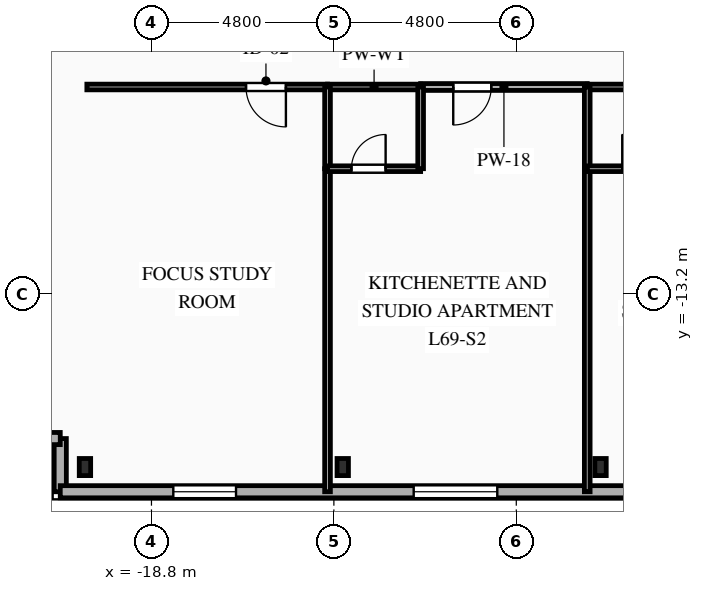
"""IFC4 building model, lengths in metres.
Left out: names, types, materials, properties, quantities, classifications, styles, units other than length and angle.
Written with IfcOpenShell. Run it as: python <this file> out.ifc"""

import sys

from ifc_helpers import new_model, si_unit, direction, frame, frame_2d, origin, origin_2d, place, context, subcontext, project, spatial, rectangle, i_section, extrude, element, fill, save


model = new_model("IFC4")
c1 = context("Model", 3, precision=1e-05, world=origin(), true_north=direction((0.0, 1.0)))
c2 = subcontext(c1, "Body", "Model", "MODEL_VIEW")
j1 = project(units=[si_unit("LENGTHUNIT", "METRE"), si_unit("PLANEANGLEUNIT", "RADIAN")], contexts=[c1])
p1 = place(None, origin())
s1 = spatial("IfcSite", under=j1, at=p1, CompositionType="ELEMENT")
p2 = place(p1, origin())
s2 = spatial("IfcBuilding", under=s1, at=p2, CompositionType="ELEMENT")
p3 = place(p2, frame((0.0, 0.0, 245.05)))
s3 = spatial("IfcBuildingStorey", under=s2, at=p3, CompositionType="ELEMENT", Elevation=245.05)
for number, where, z_axis, x_axis in (
    (1, (-20.55, -17.75, 0.0), (0.0, 0.0, 1.0), (1.0, 0.0, 0.0)),
    (2, (-13.767, -17.75, 0.0), (0.0, 0.0, 1.0), (1.0, 0.0, 0.0)),
    (3, (-6.983, -17.75, 0.0), (0.0, 0.0, 1.0), (1.0, 0.0, 0.0)),
):
    element("IfcColumn", number, at=place(p3, frame(where, z_axis=z_axis, x_axis=x_axis)), inside=s3, PredefinedType="COLUMN", context=c2, shape_type="SweptSolid", body=[
        extrude(i_section(OverallWidth=0.3, OverallDepth=0.45, WebThickness=0.014, FlangeThickness=0.026, FilletRadius=0.027, at=origin_2d()), origin(), (0.0, 0.0, 1.0), 3.35),
    ])
p4 = place(p3, frame((-21.2, -18.4, 0.0), z_axis=(0.0, 0.0, 1.0), x_axis=(0.0, 1.0, 0.0)))
e4 = element("IfcWall", 4, at=p4, inside=s3, PredefinedType="SOLIDWALL", context=c2, shape_type="SweptSolid", body=[
    extrude(rectangle(XDim=1.4, YDim=0.32, at=frame_2d((0.7, 0.0))), origin(), (0.0, 0.0, 1.0), 3.04),
])
p5 = place(p3, frame((-21.2, -17.0, 0.0), z_axis=(0.0, 0.0, 1.0), x_axis=(-1.0, 0.0, 0.0)))
e5 = element("IfcWall", 5, at=p5, inside=s3, PredefinedType="SOLIDWALL", context=c2, shape_type="SweptSolid", body=[
    extrude(rectangle(XDim=1.4, YDim=0.32, at=frame_2d((0.7, 0.0))), origin(), (0.0, 0.0, 1.0), 3.04),
])
p6 = place(p3, frame((20.8, -18.4, 0.0), z_axis=(0.0, 0.0, 1.0), x_axis=(-1.0, 0.0, 0.0)))
e6 = element("IfcWall", 6, at=p6, inside=s3, PredefinedType="SOLIDWALL", context=c2, shape_type="SweptSolid", body=[
    extrude(rectangle(XDim=42.0, YDim=0.32, at=frame_2d((21.0, 0.0))), origin(), (0.0, 0.0, 1.0), 3.04),
])
p7 = place(p6, frame((3.255, 0.0, 0.85)))
e7 = element("IfcOpeningElement", 7, at=p7, cuts=e6, PredefinedType="OPENING", context=c2, shape_type="SweptSolid", body=[
    extrude(rectangle(XDim=1.65, YDim=1.85, at=frame_2d((0.825, 0.925))), frame((0.0, 0.17, 0.0), z_axis=(0.0, -1.0, 0.0), x_axis=(1.0, 0.0, 0.0)), (0.0, 0.0, 1.0), 0.34),
])
p8 = place(p6, frame((9.98, 0.0, 0.85)))
e8 = element("IfcOpeningElement", 8, at=p8, cuts=e6, PredefinedType="OPENING", context=c2, shape_type="SweptSolid", body=[
    extrude(rectangle(XDim=2.2, YDim=1.85, at=frame_2d((1.1, 0.925))), frame((0.0, 0.17, 0.0), z_axis=(0.0, -1.0, 0.0), x_axis=(1.0, 0.0, 0.0)), (0.0, 0.0, 1.0), 0.34),
])
p9 = place(p6, frame((16.82, 0.0, 0.85)))
e9 = element("IfcOpeningElement", 9, at=p9, cuts=e6, PredefinedType="OPENING", context=c2, shape_type="SweptSolid", body=[
    extrude(rectangle(XDim=2.2, YDim=1.85, at=frame_2d((1.1, 0.925))), frame((0.0, 0.17, 0.0), z_axis=(0.0, -1.0, 0.0), x_axis=(1.0, 0.0, 0.0)), (0.0, 0.0, 1.0), 0.34),
])
p10 = place(p6, frame((23.66, 0.0, 0.85)))
e10 = element("IfcOpeningElement", 10, at=p10, cuts=e6, PredefinedType="OPENING", context=c2, shape_type="SweptSolid", body=[
    extrude(rectangle(XDim=2.2, YDim=1.85, at=frame_2d((1.1, 0.925))), frame((0.0, 0.17, 0.0), z_axis=(0.0, -1.0, 0.0), x_axis=(1.0, 0.0, 0.0)), (0.0, 0.0, 1.0), 0.34),
])
p11 = place(p6, frame((30.5, 0.0, 0.85)))
e11 = element("IfcOpeningElement", 11, at=p11, cuts=e6, PredefinedType="OPENING", context=c2, shape_type="SweptSolid", body=[
    extrude(rectangle(XDim=2.2, YDim=1.85, at=frame_2d((1.1, 0.925))), frame((0.0, 0.17, 0.0), z_axis=(0.0, -1.0, 0.0), x_axis=(1.0, 0.0, 0.0)), (0.0, 0.0, 1.0), 0.34),
])
p12 = place(p6, frame((37.375, 0.0, 0.85)))
e12 = element("IfcOpeningElement", 12, at=p12, cuts=e6, PredefinedType="OPENING", context=c2, shape_type="SweptSolid", body=[
    extrude(rectangle(XDim=1.65, YDim=1.85, at=frame_2d((0.825, 0.925))), frame((0.0, 0.17, 0.0), z_axis=(0.0, -1.0, 0.0), x_axis=(1.0, 0.0, 0.0)), (0.0, 0.0, 1.0), 0.34),
])
p13 = place(p3, frame((-14.167, -7.75, 0.0), z_axis=(0.0, 0.0, 1.0), x_axis=(-1.0, 0.0, 0.0)))
e13 = element("IfcWall", 13, at=p13, inside=s3, PredefinedType="PARTITIONING", context=c2, shape_type="SweptSolid", body=[
    extrude(rectangle(XDim=6.333, YDim=0.15, at=frame_2d((3.167, 0.0))), origin(), (0.0, 0.0, 1.0), 3.04),
])
p14 = place(p13, frame((1.095, 0.0, 0.0)))
e14 = element("IfcOpeningElement", 14, at=p14, cuts=e13, PredefinedType="OPENING", context=c2, shape_type="SweptSolid", body=[
    extrude(rectangle(XDim=1.05, YDim=2.15, at=frame_2d((0.525, 1.075))), frame((0.0, 0.085, 0.0), z_axis=(0.0, -1.0, 0.0), x_axis=(1.0, 0.0, 0.0)), (0.0, 0.0, 1.0), 0.17),
])
p15 = place(p3, frame((-7.333, -7.75, 0.0), z_axis=(0.0, 0.0, 1.0), x_axis=(-1.0, 0.0, 0.0)))
e15 = element("IfcWall", 15, at=p15, inside=s3, PredefinedType="PARTITIONING", context=c2, shape_type="SweptSolid", body=[
    extrude(rectangle(XDim=4.384, YDim=0.18, at=frame_2d((2.192, 0.0))), origin(), (0.0, 0.0, 1.0), 3.04),
])
p16 = place(p15, frame((2.526, 0.0, 0.0)))
e16 = element("IfcOpeningElement", 16, at=p16, cuts=e15, PredefinedType="OPENING", context=c2, shape_type="SweptSolid", body=[
    extrude(rectangle(XDim=1.0, YDim=2.15, at=frame_2d((0.5, 1.075))), frame((0.0, 0.1, 0.0), z_axis=(0.0, -1.0, 0.0), x_axis=(1.0, 0.0, 0.0)), (0.0, 0.0, 1.0), 0.2),
])
for number, where, z_axis, x_axis in (
    (17, (-11.717, -7.75, 0.0), (0.0, 0.0, 1.0), (-1.0, 0.0, 0.0)),
    (18, (-4.883, -7.75, 0.0), (0.0, 0.0, 1.0), (-1.0, 0.0, 0.0)),
):
    element("IfcWall", number, at=place(p3, frame(where, z_axis=z_axis, x_axis=x_axis)), inside=s3, PredefinedType="PLUMBINGWALL", context=c2, shape_type="SweptSolid", body=[
        extrude(rectangle(XDim=2.45, YDim=0.15, at=frame_2d((1.225, 0.0))), origin(), (0.0, 0.0, 1.0), 3.04),
    ])
p17 = place(p3, frame((-14.167, -9.9, 0.0), z_axis=(0.0, 0.0, 1.0), x_axis=(0.0, -1.0, 0.0)))
e19 = element("IfcWall", 19, at=p17, inside=s3, PredefinedType="PARTITIONING", context=c2, shape_type="SweptSolid", body=[
    extrude(rectangle(XDim=8.5, YDim=0.15, at=frame_2d((4.25, 0.0))), origin(), (0.0, 0.0, 1.0), 3.04),
])
p18 = place(p3, frame((-14.167, -7.75, 0.0), z_axis=(0.0, 0.0, 1.0), x_axis=(0.0, -1.0, 0.0)))
e20 = element("IfcWall", 20, at=p18, inside=s3, PredefinedType="PLUMBINGWALL", context=c2, shape_type="SweptSolid", body=[
    extrude(rectangle(XDim=2.15, YDim=0.15, at=frame_2d((1.075, 0.0))), origin(), (0.0, 0.0, 1.0), 3.04),
])
p19 = place(p3, frame((-14.167, -9.9, 0.0), z_axis=(0.0, 0.0, 1.0), x_axis=(1.0, 0.0, 0.0)))
e21 = element("IfcWall", 21, at=p19, inside=s3, PredefinedType="PLUMBINGWALL", context=c2, shape_type="SweptSolid", body=[
    extrude(rectangle(XDim=2.45, YDim=0.15, at=frame_2d((1.225, 0.0))), origin(), (0.0, 0.0, 1.0), 3.04),
])
p20 = place(p19, frame((0.629, 0.0, 0.0)))
e22 = element("IfcOpeningElement", 22, at=p20, cuts=e21, PredefinedType="OPENING", context=c2, shape_type="SweptSolid", body=[
    extrude(rectangle(XDim=0.9, YDim=2.1, at=frame_2d((0.45, 1.05))), frame((0.0, 0.085, 0.0), z_axis=(0.0, -1.0, 0.0), x_axis=(1.0, 0.0, 0.0)), (0.0, 0.0, 1.0), 0.17),
])
p21 = place(p3, frame((-11.717, -9.9, 0.0), z_axis=(0.0, 0.0, 1.0), x_axis=(0.0, 1.0, 0.0)))
e23 = element("IfcWall", 23, at=p21, inside=s3, PredefinedType="PLUMBINGWALL", context=c2, shape_type="SweptSolid", body=[
    extrude(rectangle(XDim=2.15, YDim=0.15, at=frame_2d((1.075, 0.0))), origin(), (0.0, 0.0, 1.0), 3.04),
])
p22 = place(p3, frame((-7.333, -9.9, 0.0), z_axis=(0.0, 0.0, 1.0), x_axis=(0.0, -1.0, 0.0)))
e24 = element("IfcWall", 24, at=p22, inside=s3, PredefinedType="PARTITIONING", context=c2, shape_type="SweptSolid", body=[
    extrude(rectangle(XDim=8.5, YDim=0.15, at=frame_2d((4.25, 0.0))), origin(), (0.0, 0.0, 1.0), 2.665),
])
p23 = place(p3, frame((-7.333, -7.75, 0.0), z_axis=(0.0, 0.0, 1.0), x_axis=(0.0, -1.0, 0.0)))
e25 = element("IfcWall", 25, at=p23, inside=s3, PredefinedType="PLUMBINGWALL", context=c2, shape_type="SweptSolid", body=[
    extrude(rectangle(XDim=2.15, YDim=0.15, at=frame_2d((1.075, 0.0))), origin(), (0.0, 0.0, 1.0), 3.04),
])
p24 = place(p3, frame((-7.333, -9.9, 0.0), z_axis=(0.0, 0.0, 1.0), x_axis=(1.0, 0.0, 0.0)))
e26 = element("IfcWall", 26, at=p24, inside=s3, PredefinedType="PLUMBINGWALL", context=c2, shape_type="SweptSolid", body=[
    extrude(rectangle(XDim=2.45, YDim=0.15, at=frame_2d((1.225, 0.0))), origin(), (0.0, 0.0, 1.0), 3.04),
])
p25 = place(p24, frame((0.921, 0.0, 0.0)))
e27 = element("IfcOpeningElement", 27, at=p25, cuts=e26, PredefinedType="OPENING", context=c2, shape_type="SweptSolid", body=[
    extrude(rectangle(XDim=0.9, YDim=2.1, at=frame_2d((0.45, 1.05))), frame((0.0, 0.085, 0.0), z_axis=(0.0, -1.0, 0.0), x_axis=(1.0, 0.0, 0.0)), (0.0, 0.0, 1.0), 0.17),
])
p26 = place(p11, origin())
e28 = element("IfcWindow", 28, at=p26, inside=s3, PartitioningType="SINGLE_PANEL", PredefinedType="WINDOW", context=c2, shape_type="SweptSolid", body=[
    extrude(rectangle(XDim=2.2, YDim=1.85, at=frame_2d((1.1, 0.925))), frame((0.0, 0.03, 0.0), z_axis=(0.0, -1.0, 0.0), x_axis=(1.0, 0.0, 0.0)), (0.0, 0.0, 1.0), 0.06),
])
fill(e11, e28)
p27 = place(p12, origin())
e29 = element("IfcWindow", 29, at=p27, inside=s3, PartitioningType="SINGLE_PANEL", PredefinedType="WINDOW", context=c2, shape_type="SweptSolid", body=[
    extrude(rectangle(XDim=1.65, YDim=1.85, at=frame_2d((0.825, 0.925))), frame((0.0, 0.03, 0.0), z_axis=(0.0, -1.0, 0.0), x_axis=(1.0, 0.0, 0.0)), (0.0, 0.0, 1.0), 0.06),
])
fill(e12, e29)
p28 = place(p14, origin())
e30 = element("IfcDoor", 30, at=p28, inside=s3, OperationType="SINGLE_SWING_LEFT", PredefinedType="DOOR", context=c2, shape_type="SweptSolid", body=[
    extrude(rectangle(XDim=1.05, YDim=2.15, at=frame_2d((0.525, 1.075))), frame((0.0, 0.025, 0.0), z_axis=(0.0, -1.0, 0.0), x_axis=(1.0, 0.0, 0.0)), (0.0, 0.0, 1.0), 0.05),
])
fill(e14, e30)
p29 = place(p16, origin())
e31 = element("IfcDoor", 31, at=p29, inside=s3, OperationType="SINGLE_SWING_RIGHT", PredefinedType="DOOR", context=c2, shape_type="SweptSolid", body=[
    extrude(rectangle(XDim=1.0, YDim=2.15, at=frame_2d((0.5, 1.075))), frame((0.0, 0.025, 0.0), z_axis=(0.0, -1.0, 0.0), x_axis=(1.0, 0.0, 0.0)), (0.0, 0.0, 1.0), 0.05),
])
fill(e16, e31)
p30 = place(p20, origin())
e32 = element("IfcDoor", 32, at=p30, inside=s3, OperationType="SINGLE_SWING_RIGHT", PredefinedType="DOOR", context=c2, shape_type="SweptSolid", body=[
    extrude(rectangle(XDim=0.9, YDim=2.1, at=frame_2d((0.45, 1.05))), frame((0.0, 0.025, 0.0), z_axis=(0.0, -1.0, 0.0), x_axis=(1.0, 0.0, 0.0)), (0.0, 0.0, 1.0), 0.05),
])
fill(e22, e32)
p31 = place(p25, origin())
e33 = element("IfcDoor", 33, at=p31, inside=s3, OperationType="SINGLE_SWING_LEFT", PredefinedType="DOOR", context=c2, shape_type="SweptSolid", body=[
    extrude(rectangle(XDim=0.9, YDim=2.1, at=frame_2d((0.45, 1.05))), frame((0.0, 0.025, 0.0), z_axis=(0.0, -1.0, 0.0), x_axis=(1.0, 0.0, 0.0)), (0.0, 0.0, 1.0), 0.05),
])
fill(e27, e33)
save(model, sys.argv[1])
